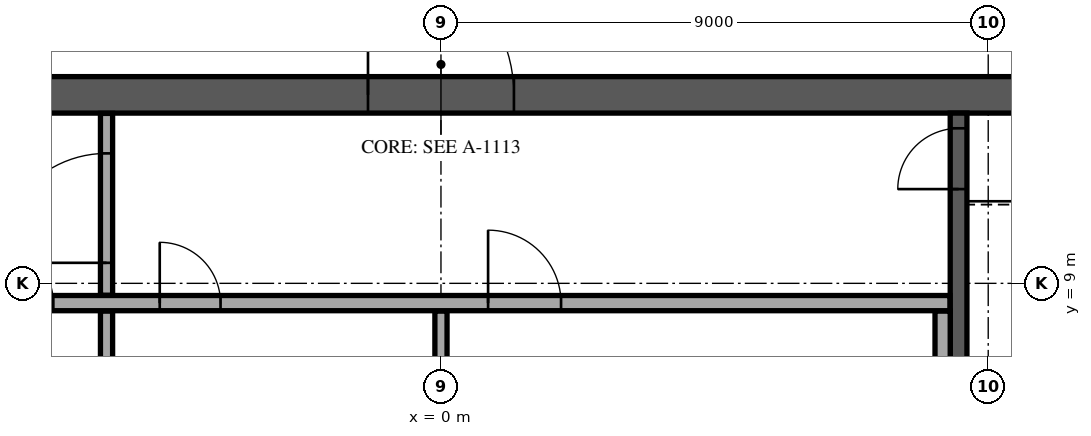
"""IFC4 building model, lengths in metres.
Left out: names, types, materials, properties, quantities, classifications, styles, units other than length and angle.
Written with IfcOpenShell. Run it as: python <this file> out.ifc"""

import sys

from ifc_helpers import new_model, si_unit, direction, frame, frame_2d, origin, place, context, subcontext, project, spatial, rectangle, extrude, element, fill, save


model = new_model("IFC4")
c1 = context("Model", 3, precision=1e-05, world=origin(), true_north=direction((0.0, 1.0)))
c2 = subcontext(c1, "Body", "Model", "MODEL_VIEW")
j1 = project(units=[si_unit("LENGTHUNIT", "METRE"), si_unit("PLANEANGLEUNIT", "RADIAN")], contexts=[c1])
p1 = place(None, origin())
s1 = spatial("IfcSite", under=j1, at=p1, CompositionType="ELEMENT")
p2 = place(p1, origin())
s2 = spatial("IfcBuilding", under=s1, at=p2, CompositionType="ELEMENT")
p3 = place(p2, frame((0.0, 0.0, 373.1)))
s3 = spatial("IfcBuildingStorey", under=s2, at=p3, CompositionType="ELEMENT", Elevation=373.1)
p4 = place(p3, frame((-12.4, 12.1, 0.0), z_axis=(0.0, 0.0, 1.0), x_axis=(1.0, 0.0, 0.0)))
e1 = element("IfcWall", 1, at=p4, inside=s3, PredefinedType="SHEAR", context=c2, shape_type="SweptSolid", body=[
    extrude(rectangle(XDim=24.8, YDim=0.6, at=frame_2d((12.4, 0.0))), origin(), (0.0, 0.0, 1.0), 3.2),
])
p5 = place(p4, frame((11.2, 0.0, 0.0)))
e2 = element("IfcOpeningElement", 2, at=p5, cuts=e1, PredefinedType="OPENING", context=c2, shape_type="SweptSolid", body=[
    extrude(rectangle(XDim=2.4, YDim=2.4, at=frame_2d((1.2, 1.2))), frame((0.0, 0.31, 0.0), z_axis=(0.0, -1.0, 0.0), x_axis=(1.0, 0.0, 0.0)), (0.0, 0.0, 1.0), 0.62),
])
p6 = place(p4, frame((22.025, 0.0, 0.0)))
e3 = element("IfcOpeningElement", 3, at=p6, cuts=e1, PredefinedType="OPENING", context=c2, shape_type="SweptSolid", body=[
    extrude(rectangle(XDim=1.2, YDim=2.1, at=frame_2d((0.6, 1.05))), frame((0.0, 0.31, 0.0), z_axis=(0.0, -1.0, 0.0), x_axis=(1.0, 0.0, 0.0)), (0.0, 0.0, 1.0), 0.62),
])
p7 = place(p4, frame((1.0, 0.0, 0.0)))
e4 = element("IfcOpeningElement", 4, at=p7, cuts=e1, PredefinedType="OPENING", context=c2, shape_type="SweptSolid", body=[
    extrude(rectangle(XDim=1.0, YDim=2.1, at=frame_2d((0.5, 1.05))), frame((0.0, 0.31, 0.0), z_axis=(0.0, -1.0, 0.0), x_axis=(1.0, 0.0, 0.0)), (0.0, 0.0, 1.0), 0.62),
])
p8 = place(p3, frame((8.512, 4.55, 0.0), z_axis=(0.0, 0.0, 1.0), x_axis=(0.0, 1.0, 0.0)))
e5 = element("IfcWall", 5, at=p8, inside=s3, PredefinedType="SOLIDWALL", context=c2, shape_type="SweptSolid", body=[
    extrude(rectangle(XDim=7.25, YDim=0.275, at=frame_2d((3.625, 0.0))), origin(), (0.0, 0.0, 1.0), 3.2),
])
p9 = place(p8, frame((6.0, 0.0, 0.0)))
e6 = element("IfcOpeningElement", 6, at=p9, cuts=e5, PredefinedType="OPENING", context=c2, shape_type="SweptSolid", body=[
    extrude(rectangle(XDim=1.0, YDim=2.1, at=frame_2d((0.5, 1.05))), frame((0.0, 0.147, 0.0), z_axis=(0.0, -1.0, 0.0), x_axis=(1.0, 0.0, 0.0)), (0.0, 0.0, 1.0), 0.295),
])
for number, where, z_axis, x_axis in (
    (7, (-5.5, 5.855, 0.0), (0.0, 0.0, 1.0), (0.0, 1.0, 0.0)),
    (8, (0.0, 5.855, 0.0), (0.0, 0.0, 1.0), (0.0, 1.0, 0.0)),
):
    element("IfcWall", number, at=place(p3, frame(where, z_axis=z_axis, x_axis=x_axis)), inside=s3, PredefinedType="PARTITIONING", context=c2, shape_type="SweptSolid", body=[
        extrude(rectangle(XDim=2.69, YDim=0.2, at=frame_2d((1.345, 0.0))), origin(), (0.0, 0.0, 1.0), 3.2),
    ])
p10 = place(p3, frame((8.25, 5.855, 0.0), z_axis=(0.0, 0.0, 1.0), x_axis=(0.0, 1.0, 0.0)))
e9 = element("IfcWall", 9, at=p10, inside=s3, PredefinedType="PARTITIONING", context=c2, shape_type="SweptSolid", body=[
    extrude(rectangle(XDim=2.69, YDim=0.25, at=frame_2d((1.345, 0.0))), origin(), (0.0, 0.0, 1.0), 3.2),
])
p11 = place(p3, frame((-8.35, 8.675, 0.0), z_axis=(0.0, 0.0, 1.0), x_axis=(1.0, 0.0, 0.0)))
e10 = element("IfcWall", 10, at=p11, inside=s3, PredefinedType="PARTITIONING", context=c2, shape_type="SweptSolid", body=[
    extrude(rectangle(XDim=16.72, YDim=0.25, at=frame_2d((8.36, 0.0))), origin(), (0.0, 0.0, 1.0), 3.2),
])
p12 = place(p11, frame((0.975, 0.0, 0.0)))
e11 = element("IfcOpeningElement", 11, at=p12, cuts=e10, PredefinedType="OPENING", context=c2, shape_type="SweptSolid", body=[
    extrude(rectangle(XDim=1.0, YDim=2.1, at=frame_2d((0.5, 1.05))), frame((0.0, 0.135, 0.0), z_axis=(0.0, -1.0, 0.0), x_axis=(1.0, 0.0, 0.0)), (0.0, 0.0, 1.0), 0.27),
])
p13 = place(p11, frame((3.725, 0.0, 0.0)))
e12 = element("IfcOpeningElement", 12, at=p13, cuts=e10, PredefinedType="OPENING", context=c2, shape_type="SweptSolid", body=[
    extrude(rectangle(XDim=1.0, YDim=2.1, at=frame_2d((0.5, 1.05))), frame((0.0, 0.135, 0.0), z_axis=(0.0, -1.0, 0.0), x_axis=(1.0, 0.0, 0.0)), (0.0, 0.0, 1.0), 0.27),
])
p14 = place(p11, frame((9.125, 0.0, 0.0)))
e13 = element("IfcOpeningElement", 13, at=p14, cuts=e10, PredefinedType="OPENING", context=c2, shape_type="SweptSolid", body=[
    extrude(rectangle(XDim=1.2, YDim=2.1, at=frame_2d((0.6, 1.05))), frame((0.0, 0.135, 0.0), z_axis=(0.0, -1.0, 0.0), x_axis=(1.0, 0.0, 0.0)), (0.0, 0.0, 1.0), 0.27),
])
p15 = place(p3, frame((-5.5, 8.805, 0.0), z_axis=(0.0, 0.0, 1.0), x_axis=(0.0, 1.0, 0.0)))
e14 = element("IfcWall", 14, at=p15, inside=s3, PredefinedType="PARTITIONING", context=c2, shape_type="SweptSolid", body=[
    extrude(rectangle(XDim=2.99, YDim=0.2, at=frame_2d((1.495, 0.0))), origin(), (0.0, 0.0, 1.0), 3.2),
])
p16 = place(p15, frame((0.532, 0.0, 0.0)))
e15 = element("IfcOpeningElement", 15, at=p16, cuts=e14, PredefinedType="OPENING", context=c2, shape_type="SweptSolid", body=[
    extrude(rectangle(XDim=1.8, YDim=2.1, at=frame_2d((0.9, 1.05))), frame((0.0, 0.11, 0.0), z_axis=(0.0, -1.0, 0.0), x_axis=(1.0, 0.0, 0.0)), (0.0, 0.0, 1.0), 0.22),
])
p17 = place(p5, origin())
e16 = element("IfcDoor", 16, at=p17, inside=s3, OperationType="SINGLE_SWING_LEFT", PredefinedType="DOOR", context=c2, shape_type="SweptSolid", body=[
    extrude(rectangle(XDim=2.4, YDim=2.4, at=frame_2d((1.2, 1.2))), frame((0.0, 0.025, 0.0), z_axis=(0.0, -1.0, 0.0), x_axis=(1.0, 0.0, 0.0)), (0.0, 0.0, 1.0), 0.05),
])
fill(e2, e16)
p18 = place(p9, origin())
e17 = element("IfcDoor", 17, at=p18, inside=s3, OperationType="SINGLE_SWING_LEFT", PredefinedType="DOOR", context=c2, shape_type="SweptSolid", body=[
    extrude(rectangle(XDim=1.0, YDim=2.1, at=frame_2d((0.5, 1.05))), frame((0.0, 0.025, 0.0), z_axis=(0.0, -1.0, 0.0), x_axis=(1.0, 0.0, 0.0)), (0.0, 0.0, 1.0), 0.05),
])
fill(e6, e17)
p19 = place(p12, origin())
e18 = element("IfcDoor", 18, at=p19, inside=s3, OperationType="SINGLE_SWING_RIGHT", PredefinedType="DOOR", context=c2, shape_type="SweptSolid", body=[
    extrude(rectangle(XDim=1.0, YDim=2.1, at=frame_2d((0.5, 1.05))), frame((0.0, 0.025, 0.0), z_axis=(0.0, -1.0, 0.0), x_axis=(1.0, 0.0, 0.0)), (0.0, 0.0, 1.0), 0.05),
])
fill(e11, e18)
p20 = place(p13, origin())
e19 = element("IfcDoor", 19, at=p20, inside=s3, OperationType="SINGLE_SWING_RIGHT", PredefinedType="DOOR", context=c2, shape_type="SweptSolid", body=[
    extrude(rectangle(XDim=1.0, YDim=2.1, at=frame_2d((0.5, 1.05))), frame((0.0, 0.025, 0.0), z_axis=(0.0, -1.0, 0.0), x_axis=(1.0, 0.0, 0.0)), (0.0, 0.0, 1.0), 0.05),
])
fill(e12, e19)
p21 = place(p14, origin())
e20 = element("IfcDoor", 20, at=p21, inside=s3, OperationType="SINGLE_SWING_LEFT", PredefinedType="DOOR", context=c2, shape_type="SweptSolid", body=[
    extrude(rectangle(XDim=1.2, YDim=2.1, at=frame_2d((0.6, 1.05))), frame((0.0, 0.025, 0.0), z_axis=(0.0, -1.0, 0.0), x_axis=(1.0, 0.0, 0.0)), (0.0, 0.0, 1.0), 0.05),
])
fill(e13, e20)
p22 = place(p16, origin())
e21 = element("IfcDoor", 21, at=p22, inside=s3, OperationType="SINGLE_SWING_LEFT", PredefinedType="DOOR", context=c2, shape_type="SweptSolid", body=[
    extrude(rectangle(XDim=1.8, YDim=2.1, at=frame_2d((0.9, 1.05))), frame((0.0, 0.025, 0.0), z_axis=(0.0, -1.0, 0.0), x_axis=(1.0, 0.0, 0.0)), (0.0, 0.0, 1.0), 0.05),
])
fill(e15, e21)
save(model, sys.argv[1])
